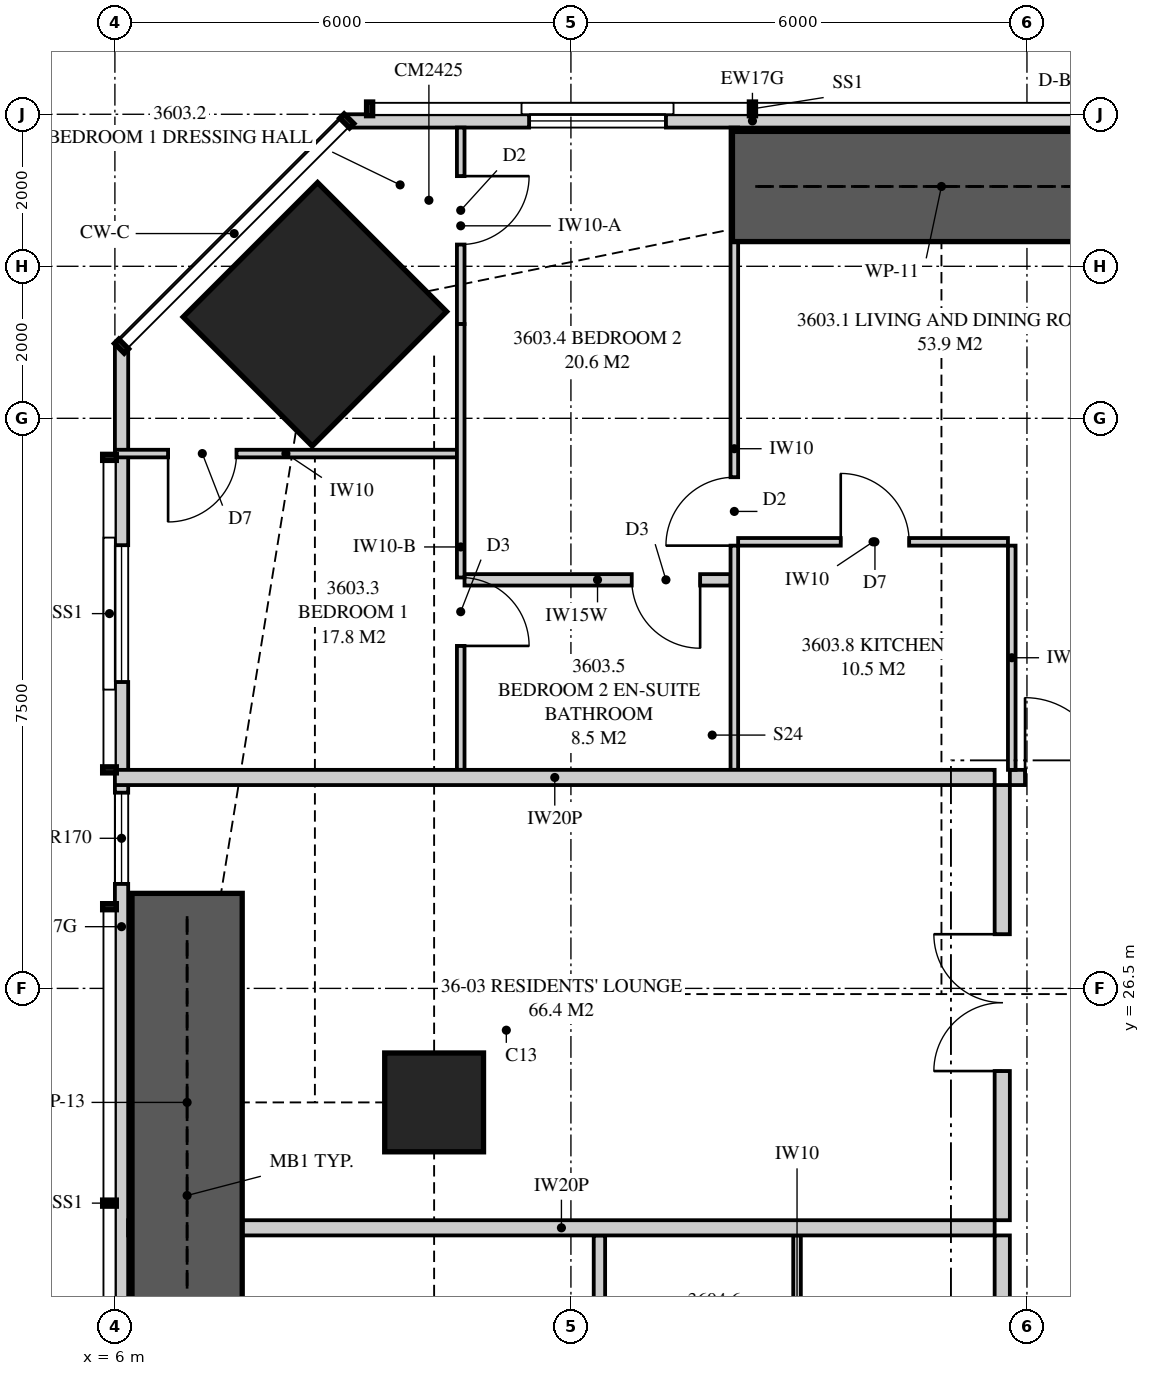
"""IFC4 building model, lengths in metres.
Left out: names, types, materials, properties, quantities, classifications, styles, units other than length and angle.
Written with IfcOpenShell. Run it as: python <this file> out.ifc"""

import sys

from ifc_helpers import new_model, si_unit, direction, frame, frame_2d, origin, origin_2d, place, context, subcontext, project, spatial, polyline, rectangle, outline, extrude, element, fill, save


model = new_model("IFC4")
c1 = context("Model", 3, precision=1e-05, world=origin(), true_north=direction((0.0, 1.0)))
c2 = subcontext(c1, "Body", "Model", "MODEL_VIEW")
j1 = project(units=[si_unit("LENGTHUNIT", "METRE"), si_unit("PLANEANGLEUNIT", "RADIAN")], contexts=[c1])
p1 = place(None, origin())
s1 = spatial("IfcSite", under=j1, at=p1, CompositionType="ELEMENT")
p2 = place(p1, origin())
s2 = spatial("IfcBuilding", under=s1, at=p2, CompositionType="ELEMENT")
p3 = place(p2, frame((0.0, 0.0, 131.65)))
s3 = spatial("IfcBuildingStorey", under=s2, at=p3, CompositionType="ELEMENT", Elevation=131.65)
p4 = place(p3, frame((8.631, 35.369, 0.0), z_axis=(0.0, 0.0, 1.0), x_axis=(0.707106781187, -0.707106781187, 0.0)))
e1 = element("IfcColumn", 1, at=p4, inside=s3, PredefinedType="COLUMN", context=c2, shape_type="SweptSolid", body=[
    extrude(rectangle(XDim=2.4, YDim=2.5, at=origin_2d()), origin(), (0.0, 0.0, 1.0), 3.35),
])
p5 = place(p3, frame((10.2, 25.0, 0.0), z_axis=(0.0, 0.0, 1.0), x_axis=(1.0, 0.0, 0.0)))
e2 = element("IfcColumn", 2, at=p5, inside=s3, PredefinedType="COLUMN", context=c2, shape_type="SweptSolid", body=[
    extrude(rectangle(XDim=1.3, YDim=1.3, at=origin_2d()), origin(), (0.0, 0.0, 1.0), 3.35),
])
p6 = place(p3, frame((19.725, 37.913, 0.0), z_axis=(0.0, 0.0, 1.0), x_axis=(-1.0, 0.0, 0.0)))
e3 = element("IfcWall", 3, at=p6, inside=s3, PredefinedType="SOLIDWALL", context=c2, shape_type="SweptSolid", body=[
    extrude(outline(polyline([(0.0, 0.0), (10.674, 0.0), (10.674, 3.11), (3.053, 3.11), (3.053, 2.15), (3.008, 2.15), (3.008, 3.11), (2.85, 3.11), (2.85, 2.15), (0.0, 2.15), (0.0, 0.0)])), frame((0.0, 0.087, 0.0), z_axis=(0.0, -1.0, 0.0), x_axis=(1.0, 0.0, 0.0)), (0.0, 0.0, 1.0), 0.175),
])
p7 = place(p6, frame((6.475, 0.0, 0.4)))
e4 = element("IfcOpeningElement", 4, at=p7, cuts=e3, PredefinedType="OPENING", context=c2, shape_type="SweptSolid", body=[
    extrude(rectangle(XDim=1.8, YDim=1.7, at=frame_2d((0.9, 0.85))), frame((0.0, 0.097, 0.0), z_axis=(0.0, -1.0, 0.0), x_axis=(1.0, 0.0, 0.0)), (0.0, 0.0, 1.0), 0.195),
])
p8 = place(p3, frame((6.087, 34.949, 0.0), z_axis=(0.0, 0.0, 1.0), x_axis=(0.0, -1.0, 0.0)))
e5 = element("IfcWall", 5, at=p8, inside=s3, PredefinedType="SOLIDWALL", context=c2, shape_type="SweptSolid", body=[
    extrude(outline(polyline([(0.0, 0.0), (15.274, 0.0), (15.274, 2.15), (9.949, 2.15), (9.949, 3.11), (9.823, 3.11), (9.823, 2.15), (9.73, 2.15), (9.73, 3.11), (0.0, 3.11), (0.0, 0.0)])), frame((0.0, 0.087, 0.0), z_axis=(0.0, -1.0, 0.0), x_axis=(1.0, 0.0, 0.0)), (0.0, 0.0, 1.0), 0.175),
])
p9 = place(p8, frame((2.618, 0.0, 0.4)))
e6 = element("IfcOpeningElement", 6, at=p9, cuts=e5, PredefinedType="OPENING", context=c2, shape_type="SweptSolid", body=[
    extrude(rectangle(XDim=1.8, YDim=1.7, at=frame_2d((0.9, 0.85))), frame((0.0, 0.097, 0.0), z_axis=(0.0, -1.0, 0.0), x_axis=(1.0, 0.0, 0.0)), (0.0, 0.0, 1.0), 0.195),
])
p10 = place(p8, frame((5.874, 0.0, 0.4)))
e7 = element("IfcOpeningElement", 7, at=p10, cuts=e5, PredefinedType="OPENING", context=c2, shape_type="SweptSolid", body=[
    extrude(rectangle(XDim=1.2, YDim=1.7, at=frame_2d((0.6, 0.85))), frame((0.0, 0.097, 0.0), z_axis=(0.0, -1.0, 0.0), x_axis=(1.0, 0.0, 0.0)), (0.0, 0.0, 1.0), 0.195),
])
p11 = place(p8, frame((12.819, 0.0, 0.4)))
e8 = element("IfcOpeningElement", 8, at=p11, cuts=e5, PredefinedType="OPENING", context=c2, shape_type="SweptSolid", body=[
    extrude(rectangle(XDim=1.8, YDim=1.7, at=frame_2d((0.9, 0.85))), frame((0.0, 0.097, 0.0), z_axis=(0.0, -1.0, 0.0), x_axis=(1.0, 0.0, 0.0)), (0.0, 0.0, 1.0), 0.195),
])
p12 = place(p3, frame((17.775, 29.275, 0.0), z_axis=(0.0, 0.0, 1.0), x_axis=(1.0, 0.0, 0.0)))
e9 = element("IfcWall", 9, at=p12, inside=s3, PredefinedType="PARTITIONING", context=c2, shape_type="SweptSolid", body=[
    extrude(rectangle(XDim=8.225, YDim=0.2, at=frame_2d((4.113, 0.0))), origin(), (0.0, 0.0, 1.0), 3.11),
])
p13 = place(p12, frame((0.2, 0.0, 0.0)))
e10 = element("IfcOpeningElement", 10, at=p13, cuts=e9, PredefinedType="OPENING", context=c2, shape_type="SweptSolid", body=[
    extrude(rectangle(XDim=1.05, YDim=2.2, at=frame_2d((0.525, 1.1))), frame((0.0, 0.11, 0.0), z_axis=(0.0, -1.0, 0.0), x_axis=(1.0, 0.0, 0.0)), (0.0, 0.0, 1.0), 0.22),
])
p14 = place(p3, frame((10.55, 37.825, 0.0), z_axis=(0.0, 0.0, 1.0), x_axis=(0.0, -1.0, 0.0)))
e11 = element("IfcWall", 11, at=p14, inside=s3, PredefinedType="PARTITIONING", context=c2, shape_type="SweptSolid", body=[
    extrude(outline(polyline([(0.0, 0.0), (2.585, 0.0), (2.585, 2.15), (1.188, 2.15), (1.188, 3.11), (0.0, 3.11), (0.0, 0.0)])), frame((0.0, 0.05, 0.0), z_axis=(0.0, -1.0, 0.0), x_axis=(1.0, 0.0, 0.0)), (0.0, 0.0, 1.0), 0.1),
])
p15 = place(p14, frame((0.639, 0.0, 0.0)))
e12 = element("IfcOpeningElement", 12, at=p15, cuts=e11, PredefinedType="OPENING", context=c2, shape_type="SweptSolid", body=[
    extrude(rectangle(XDim=0.9, YDim=2.1, at=frame_2d((0.45, 1.05))), frame((0.0, 0.06, 0.0), z_axis=(0.0, -1.0, 0.0), x_axis=(1.0, 0.0, 0.0)), (0.0, 0.0, 1.0), 0.12),
])
p16 = place(p3, frame((10.55, 35.24, 0.0), z_axis=(0.0, 0.0, 1.0), x_axis=(0.0, -1.0, 0.0)))
e13 = element("IfcWall", 13, at=p16, inside=s3, PredefinedType="PARTITIONING", context=c2, shape_type="SweptSolid", body=[
    extrude(outline(polyline([(0.0, 0.0), (5.865, 0.0), (5.865, 2.51), (0.358, 2.51), (0.358, 2.15), (0.0, 2.15), (0.0, 0.0)])), frame((0.0, 0.05, 0.0), z_axis=(0.0, -1.0, 0.0), x_axis=(1.0, 0.0, 0.0)), (0.0, 0.0, 1.0), 0.1),
])
p17 = place(p16, frame((3.334, 0.0, 0.0)))
e14 = element("IfcOpeningElement", 14, at=p17, cuts=e13, PredefinedType="OPENING", context=c2, shape_type="SweptSolid", body=[
    extrude(rectangle(XDim=0.9, YDim=2.1, at=frame_2d((0.45, 1.05))), frame((0.0, 0.06, 0.0), z_axis=(0.0, -1.0, 0.0), x_axis=(1.0, 0.0, 0.0)), (0.0, 0.0, 1.0), 0.12),
])
p18 = place(p3, frame((14.15, 37.825, 0.0), z_axis=(0.0, 0.0, 1.0), x_axis=(0.0, -1.0, 0.0)))
e15 = element("IfcWall", 15, at=p18, inside=s3, PredefinedType="PARTITIONING", context=c2, shape_type="SweptSolid", body=[
    extrude(outline(polyline([(0.0, 0.0), (8.45, 0.0), (8.45, 3.11), (2.208, 3.11), (2.208, 2.15), (0.453, 2.15), (0.453, 3.11), (0.0, 3.11), (0.0, 0.0)])), frame((0.0, 0.05, 0.0), z_axis=(0.0, -1.0, 0.0), x_axis=(1.0, 0.0, 0.0)), (0.0, 0.0, 1.0), 0.1),
])
p19 = place(p18, frame((4.6, 0.0, 0.0)))
e16 = element("IfcOpeningElement", 16, at=p19, cuts=e15, PredefinedType="OPENING", context=c2, shape_type="SweptSolid", body=[
    extrude(rectangle(XDim=0.9, YDim=2.1, at=frame_2d((0.45, 1.05))), frame((0.0, 0.06, 0.0), z_axis=(0.0, -1.0, 0.0), x_axis=(1.0, 0.0, 0.0)), (0.0, 0.0, 1.0), 0.12),
])
p20 = place(p3, frame((6.0, 33.536, 0.0), z_axis=(0.0, 0.0, 1.0), x_axis=(1.0, 0.0, 0.0)))
e17 = element("IfcWall", 17, at=p20, inside=s3, PredefinedType="PARTITIONING", context=c2, shape_type="SweptSolid", body=[
    extrude(outline(polyline([(0.0, 0.0), (4.5, 0.0), (4.5, 3.11), (4.5, 2.51), (3.206, 2.51), (3.206, 2.15), (1.463, 2.15), (1.463, 3.11), (0.0, 3.11), (0.0, 0.0)])), frame((0.0, 0.05, 0.0), z_axis=(0.0, -1.0, 0.0), x_axis=(1.0, 0.0, 0.0)), (0.0, 0.0, 1.0), 0.1),
])
p21 = place(p20, frame((0.7, 0.0, 0.0)))
e18 = element("IfcOpeningElement", 18, at=p21, cuts=e17, PredefinedType="OPENING", context=c2, shape_type="SweptSolid", body=[
    extrude(rectangle(XDim=0.9, YDim=2.1, at=frame_2d((0.45, 1.05))), frame((0.0, 0.06, 0.0), z_axis=(0.0, -1.0, 0.0), x_axis=(1.0, 0.0, 0.0)), (0.0, 0.0, 1.0), 0.12),
])
p22 = place(p3, frame((10.6, 31.875, 0.0), z_axis=(0.0, 0.0, 1.0), x_axis=(1.0, 0.0, 0.0)))
e19 = element("IfcWall", 19, at=p22, inside=s3, PredefinedType="PLUMBINGWALL", context=c2, shape_type="SweptSolid", body=[
    extrude(outline(polyline([(0.0, 0.0), (3.5, 0.0), (3.5, 3.11), (0.885, 3.11), (0.885, 2.51), (0.0, 2.51), (0.0, 3.11), (0.0, 0.0)])), frame((0.0, 0.075, 0.0), z_axis=(0.0, -1.0, 0.0), x_axis=(1.0, 0.0, 0.0)), (0.0, 0.0, 1.0), 0.15),
])
p23 = place(p22, frame((2.2, 0.0, 0.0)))
e20 = element("IfcOpeningElement", 20, at=p23, cuts=e19, PredefinedType="OPENING", context=c2, shape_type="SweptSolid", body=[
    extrude(rectangle(XDim=0.9, YDim=2.1, at=frame_2d((0.45, 1.05))), frame((0.0, 0.085, 0.0), z_axis=(0.0, -1.0, 0.0), x_axis=(1.0, 0.0, 0.0)), (0.0, 0.0, 1.0), 0.17),
])
p24 = place(p3, frame((14.2, 32.375, 0.0), z_axis=(0.0, 0.0, 1.0), x_axis=(1.0, 0.0, 0.0)))
e21 = element("IfcWall", 21, at=p24, inside=s3, PredefinedType="PARTITIONING", context=c2, shape_type="SweptSolid", body=[
    extrude(outline(polyline([(0.0, 0.0), (3.55, 0.0), (3.55, 3.11), (2.962, 3.11), (2.962, 2.541), (2.388, 2.541), (2.388, 3.11), (0.0, 3.11), (0.0, 0.0)])), frame((0.0, 0.05, 0.0), z_axis=(0.0, -1.0, 0.0), x_axis=(1.0, 0.0, 0.0)), (0.0, 0.0, 1.0), 0.1),
])
p25 = place(p24, frame((1.35, 0.0, 0.0)))
e22 = element("IfcOpeningElement", 22, at=p25, cuts=e21, PredefinedType="OPENING", context=c2, shape_type="SweptSolid", body=[
    extrude(rectangle(XDim=0.9, YDim=2.1, at=frame_2d((0.45, 1.05))), frame((0.0, 0.06, 0.0), z_axis=(0.0, -1.0, 0.0), x_axis=(1.0, 0.0, 0.0)), (0.0, 0.0, 1.0), 0.12),
])
p26 = place(p3, frame((17.8, 32.325, 0.0), z_axis=(0.0, 0.0, 1.0), x_axis=(0.0, -1.0, 0.0)))
e23 = element("IfcWall", 23, at=p26, inside=s3, PredefinedType="PARTITIONING", context=c2, shape_type="SweptSolid", body=[
    extrude(rectangle(XDim=2.95, YDim=0.1, at=frame_2d((1.475, 0.0))), origin(), (0.0, 0.0, 1.0), 3.11),
])
p27 = place(p3, frame((6.0, 29.275, 0.0), z_axis=(0.0, 0.0, 1.0), x_axis=(1.0, 0.0, 0.0)))
e24 = element("IfcWall", 24, at=p27, inside=s3, PredefinedType="PARTITIONING", context=c2, shape_type="SweptSolid", body=[
    extrude(outline(polyline([(0.0, 0.0), (11.575, 0.0), (11.575, 3.11), (11.212, 3.11), (11.212, 2.541), (10.538, 2.541), (10.538, 3.11), (5.51, 3.11), (5.51, 2.51), (2.969, 2.51), (2.969, 2.541), (2.565, 2.541), (2.565, 2.15), (0.721, 2.15), (0.721, 3.11), (0.0, 3.11), (0.0, 0.0)])), frame((0.0, 0.1, 0.0), z_axis=(0.0, -1.0, 0.0), x_axis=(1.0, 0.0, 0.0)), (0.0, 0.0, 1.0), 0.2),
])
p28 = place(p3, frame((6.175, 23.35, 0.0), z_axis=(0.0, 0.0, 1.0), x_axis=(1.0, 0.0, 0.0)))
e25 = element("IfcWall", 25, at=p28, inside=s3, PredefinedType="PARTITIONING", context=c2, shape_type="SweptSolid", body=[
    extrude(outline(polyline([(0.529, 2.15), (0.0, 2.15), (0.0, 0.0), (0.529, 0.0), (0.529, 0.376), (1.021, 0.376), (1.021, 0.0), (11.4, 0.0), (11.4, 3.11), (5.335, 3.11), (5.335, 2.51), (2.715, 2.51), (2.715, 3.11), (1.685, 3.11), (1.685, 2.15), (1.021, 2.15), (1.021, 1.774), (0.529, 1.774), (0.529, 2.15)])), frame((0.0, 0.1, 0.0), z_axis=(0.0, -1.0, 0.0), x_axis=(1.0, 0.0, 0.0)), (0.0, 0.0, 1.0), 0.2),
])
p29 = place(p3, frame((17.675, 7.825, 0.0), z_axis=(0.0, 0.0, 1.0), x_axis=(0.0, 1.0, 0.0)))
e26 = element("IfcWall", 26, at=p29, inside=s3, PredefinedType="PARTITIONING", context=c2, shape_type="SweptSolid", body=[
    extrude(outline(polyline([(0.0, 0.0), (15.425, 0.0), (15.425, 3.11), (3.087, 3.11), (3.087, 2.541), (2.413, 2.541), (2.413, 3.11), (0.0, 3.11), (0.0, 0.0)])), frame((0.0, 0.1, 0.0), z_axis=(0.0, -1.0, 0.0), x_axis=(1.0, 0.0, 0.0)), (0.0, 0.0, 1.0), 0.2),
])
p30 = place(p29, frame((7.212, 0.0, 0.0)))
e27 = element("IfcOpeningElement", 27, at=p30, cuts=e26, PredefinedType="OPENING", context=c2, shape_type="SweptSolid", body=[
    extrude(rectangle(XDim=1.05, YDim=2.2, at=frame_2d((0.525, 1.1))), frame((0.0, 0.11, 0.0), z_axis=(0.0, -1.0, 0.0), x_axis=(1.0, 0.0, 0.0)), (0.0, 0.0, 1.0), 0.22),
])
p31 = place(p3, frame((12.375, 19.775, 0.0), z_axis=(0.0, 0.0, 1.0), x_axis=(0.0, 1.0, 0.0)))
e28 = element("IfcWall", 28, at=p31, inside=s3, PredefinedType="PLUMBINGWALL", context=c2, shape_type="SweptSolid", body=[
    extrude(rectangle(XDim=3.475, YDim=0.15, at=frame_2d((1.738, 0.0))), origin(), (0.0, 0.0, 1.0), 3.11),
])
p32 = place(p31, frame((0.4, 0.0, 0.0)))
e29 = element("IfcOpeningElement", 29, at=p32, cuts=e28, PredefinedType="OPENING", context=c2, shape_type="SweptSolid", body=[
    extrude(rectangle(XDim=0.9, YDim=2.1, at=frame_2d((0.45, 1.05))), frame((0.0, 0.085, 0.0), z_axis=(0.0, -1.0, 0.0), x_axis=(1.0, 0.0, 0.0)), (0.0, 0.0, 1.0), 0.17),
])
p33 = place(p3, frame((14.975, 19.775, 0.0), z_axis=(0.0, 0.0, 1.0), x_axis=(0.0, 1.0, 0.0)))
e30 = element("IfcWall", 30, at=p33, inside=s3, PredefinedType="PARTITIONING", context=c2, shape_type="SweptSolid", body=[
    extrude(rectangle(XDim=3.475, YDim=0.1, at=frame_2d((1.738, 0.0))), origin(), (0.0, 0.0, 1.0), 3.11),
])
p34 = place(p3, frame((17.675, 23.45, 0.0), z_axis=(0.0, 0.0, 1.0), x_axis=(0.0, 1.0, 0.0)))
e31 = element("IfcWall", 31, at=p34, inside=s3, PredefinedType="PARTITIONING", context=c2, shape_type="SweptSolid", body=[
    extrude(outline(polyline([(0.0, 0.0), (5.725, 0.0), (5.725, 3.11), (3.312, 3.11), (3.312, 2.541), (2.638, 2.541), (2.638, 3.11), (0.0, 3.11), (0.0, 0.0)])), frame((0.0, 0.1, 0.0), z_axis=(0.0, -1.0, 0.0), x_axis=(1.0, 0.0, 0.0)), (0.0, 0.0, 1.0), 0.2),
])
p35 = place(p34, frame((1.962, 0.0, 0.0)))
e32 = element("IfcOpeningElement", 32, at=p35, cuts=e31, PredefinedType="OPENING", context=c2, shape_type="SweptSolid", body=[
    extrude(rectangle(XDim=1.8, YDim=2.1, at=frame_2d((0.9, 1.05))), frame((0.0, 0.11, 0.0), z_axis=(0.0, -1.0, 0.0), x_axis=(1.0, 0.0, 0.0)), (0.0, 0.0, 1.0), 0.22),
])
for number, where, z_axis, x_axis in (
    (33, (14.125, 37.05, 0.0), (0.0, 0.0, 1.0), (1.0, 0.0, 0.0)),
    (34, (6.95, 22.25, 0.0), (0.0, 0.0, 1.0), (0.0, 1.0, 0.0)),
):
    element("IfcWall", number, at=place(p3, frame(where, z_axis=z_axis, x_axis=x_axis)), inside=s3, PredefinedType="SHEAR", context=c2, shape_type="SweptSolid", body=[
        extrude(rectangle(XDim=5.5, YDim=1.45, at=frame_2d((2.75, 0.0))), origin(), (0.0, 0.0, 1.0), 3.35),
    ])
p36 = place(p7, origin())
e35 = element("IfcWindow", 35, at=p36, inside=s3, PartitioningType="SINGLE_PANEL", PredefinedType="WINDOW", context=c2, shape_type="SweptSolid", body=[
    extrude(rectangle(XDim=1.8, YDim=1.7, at=frame_2d((0.9, 0.85))), frame((0.0, 0.03, 0.0), z_axis=(0.0, -1.0, 0.0), x_axis=(1.0, 0.0, 0.0)), (0.0, 0.0, 1.0), 0.06),
])
fill(e4, e35)
p37 = place(p9, origin())
e36 = element("IfcWindow", 36, at=p37, inside=s3, PartitioningType="SINGLE_PANEL", PredefinedType="WINDOW", context=c2, shape_type="SweptSolid", body=[
    extrude(rectangle(XDim=1.8, YDim=1.7, at=frame_2d((0.9, 0.85))), frame((0.0, 0.03, 0.0), z_axis=(0.0, -1.0, 0.0), x_axis=(1.0, 0.0, 0.0)), (0.0, 0.0, 1.0), 0.06),
])
fill(e6, e36)
p38 = place(p10, origin())
e37 = element("IfcWindow", 37, at=p38, inside=s3, PartitioningType="SINGLE_PANEL", PredefinedType="WINDOW", context=c2, shape_type="SweptSolid", body=[
    extrude(rectangle(XDim=1.2, YDim=1.7, at=frame_2d((0.6, 0.85))), frame((0.0, 0.03, 0.0), z_axis=(0.0, -1.0, 0.0), x_axis=(1.0, 0.0, 0.0)), (0.0, 0.0, 1.0), 0.06),
])
fill(e7, e37)
p39 = place(p13, origin())
e38 = element("IfcDoor", 38, at=p39, inside=s3, OperationType="SINGLE_SWING_LEFT", PredefinedType="DOOR", context=c2, shape_type="SweptSolid", body=[
    extrude(rectangle(XDim=1.05, YDim=2.2, at=frame_2d((0.525, 1.1))), frame((0.0, 0.025, 0.0), z_axis=(0.0, -1.0, 0.0), x_axis=(1.0, 0.0, 0.0)), (0.0, 0.0, 1.0), 0.05),
])
fill(e10, e38)
p40 = place(p21, frame((0.9, 0.0, 0.0), z_axis=(0.0, 0.0, 1.0), x_axis=(-1.0, 0.0, 0.0)))
e39 = element("IfcDoor", 39, at=p40, inside=s3, OperationType="SINGLE_SWING_RIGHT", PredefinedType="DOOR", context=c2, shape_type="SweptSolid", body=[
    extrude(rectangle(XDim=0.9, YDim=2.1, at=frame_2d((0.45, 1.05))), frame((0.0, 0.025, 0.0), z_axis=(0.0, -1.0, 0.0), x_axis=(1.0, 0.0, 0.0)), (0.0, 0.0, 1.0), 0.05),
])
fill(e18, e39)
p41 = place(p15, origin())
e40 = element("IfcDoor", 40, at=p41, inside=s3, OperationType="SINGLE_SWING_LEFT", PredefinedType="DOOR", context=c2, shape_type="SweptSolid", body=[
    extrude(rectangle(XDim=0.9, YDim=2.1, at=frame_2d((0.45, 1.05))), frame((0.0, 0.025, 0.0), z_axis=(0.0, -1.0, 0.0), x_axis=(1.0, 0.0, 0.0)), (0.0, 0.0, 1.0), 0.05),
])
fill(e12, e40)
p42 = place(p19, frame((0.9, 0.0, 0.0), z_axis=(0.0, 0.0, 1.0), x_axis=(-1.0, 0.0, 0.0)))
e41 = element("IfcDoor", 41, at=p42, inside=s3, OperationType="SINGLE_SWING_LEFT", PredefinedType="DOOR", context=c2, shape_type="SweptSolid", body=[
    extrude(rectangle(XDim=0.9, YDim=2.1, at=frame_2d((0.45, 1.05))), frame((0.0, 0.025, 0.0), z_axis=(0.0, -1.0, 0.0), x_axis=(1.0, 0.0, 0.0)), (0.0, 0.0, 1.0), 0.05),
])
fill(e16, e41)
p43 = place(p23, frame((0.9, 0.0, 0.0), z_axis=(0.0, 0.0, 1.0), x_axis=(-1.0, 0.0, 0.0)))
e42 = element("IfcDoor", 42, at=p43, inside=s3, OperationType="SINGLE_SWING_LEFT", PredefinedType="DOOR", context=c2, shape_type="SweptSolid", body=[
    extrude(rectangle(XDim=0.9, YDim=2.1, at=frame_2d((0.45, 1.05))), frame((0.0, 0.025, 0.0), z_axis=(0.0, -1.0, 0.0), x_axis=(1.0, 0.0, 0.0)), (0.0, 0.0, 1.0), 0.05),
])
fill(e20, e42)
p44 = place(p17, origin())
e43 = element("IfcDoor", 43, at=p44, inside=s3, OperationType="SINGLE_SWING_RIGHT", PredefinedType="DOOR", context=c2, shape_type="SweptSolid", body=[
    extrude(rectangle(XDim=0.9, YDim=2.1, at=frame_2d((0.45, 1.05))), frame((0.0, 0.025, 0.0), z_axis=(0.0, -1.0, 0.0), x_axis=(1.0, 0.0, 0.0)), (0.0, 0.0, 1.0), 0.05),
])
fill(e14, e43)
p45 = place(p25, origin())
e44 = element("IfcDoor", 44, at=p45, inside=s3, OperationType="SINGLE_SWING_LEFT", PredefinedType="DOOR", context=c2, shape_type="SweptSolid", body=[
    extrude(rectangle(XDim=0.9, YDim=2.1, at=frame_2d((0.45, 1.05))), frame((0.0, 0.025, 0.0), z_axis=(0.0, -1.0, 0.0), x_axis=(1.0, 0.0, 0.0)), (0.0, 0.0, 1.0), 0.05),
])
fill(e22, e44)
p46 = place(p35, origin())
e45 = element("IfcDoor", 45, at=p46, inside=s3, OperationType="DOUBLE_DOOR_SINGLE_SWING", PredefinedType="DOOR", context=c2, shape_type="SweptSolid", body=[
    extrude(rectangle(XDim=1.8, YDim=2.1, at=frame_2d((0.9, 1.05))), frame((0.0, 0.025, 0.0), z_axis=(0.0, -1.0, 0.0), x_axis=(1.0, 0.0, 0.0)), (0.0, 0.0, 1.0), 0.05),
])
fill(e32, e45)
save(model, sys.argv[1])
